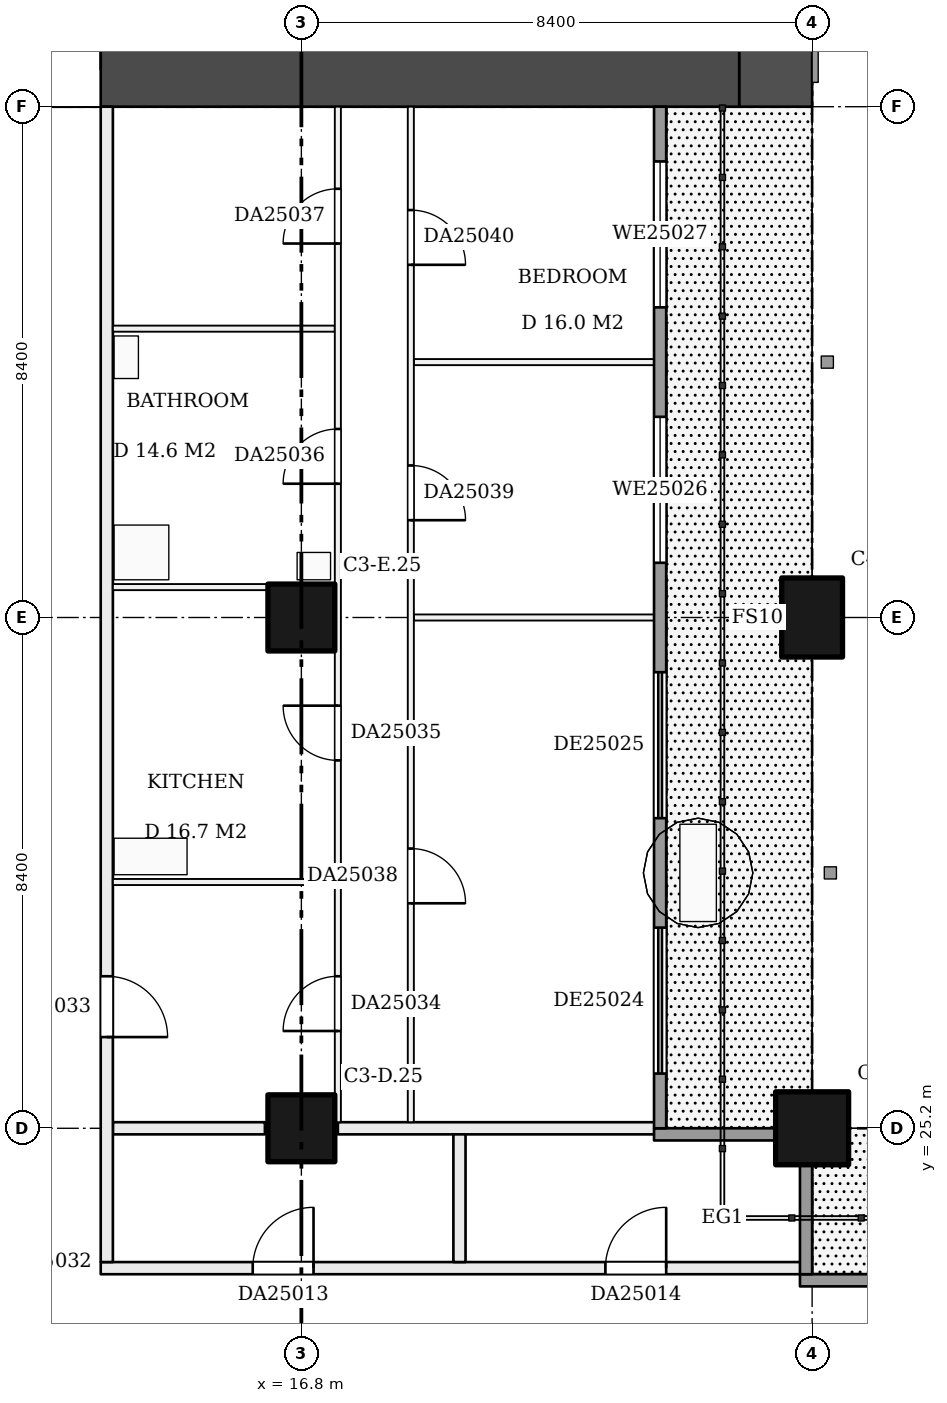
"""IFC4 building model, lengths in metres.
Left out: names, types, materials, properties, quantities, classifications, styles, units other than length and angle.
Written with IfcOpenShell. Run it as: python <this file> out.ifc"""

import sys

from ifc_helpers import new_model, si_unit, direction, frame, frame_2d, origin, origin_2d, place, context, subcontext, project, spatial, rectangle, extrude, element, fill, save


model = new_model("IFC4")
c1 = context("Model", 3, precision=1e-05, world=origin(), true_north=direction((0.0, 1.0)))
c2 = subcontext(c1, "Body", "Model", "MODEL_VIEW")
j1 = project(units=[si_unit("LENGTHUNIT", "METRE"), si_unit("PLANEANGLEUNIT", "RADIAN")], contexts=[c1])
p1 = place(None, origin())
s1 = spatial("IfcSite", under=j1, at=p1, CompositionType="ELEMENT")
p2 = place(p1, origin())
s2 = spatial("IfcBuilding", under=s1, at=p2, CompositionType="ELEMENT")
p3 = place(p2, frame((0.0, 0.0, 102.2)))
s3 = spatial("IfcBuildingStorey", under=s2, at=p3, CompositionType="ELEMENT", Elevation=102.2)
for number, where, z_axis, x_axis in (
    (1, (16.8, 25.2, 0.0), (0.0, 0.0, 1.0), (1.0, 0.0, 0.0)),
    (2, (16.8, 33.6, 0.0), (0.0, 0.0, 1.0), (1.0, 0.0, 0.0)),
):
    element("IfcColumn", number, at=place(p3, frame(where, z_axis=z_axis, x_axis=x_axis)), inside=s3, PredefinedType="COLUMN", context=c2, shape_type="SweptSolid", body=[
        extrude(rectangle(XDim=1.1, YDim=1.1, at=origin_2d()), origin(), (0.0, 0.0, 1.0), 3.22),
    ])
p4 = place(p3, frame((25.2, 25.2, 0.0), z_axis=(0.0, 0.0, 1.0), x_axis=(1.0, 0.0, 0.0)))
e3 = element("IfcColumn", 3, at=p4, inside=s3, PredefinedType="COLUMN", context=c2, shape_type="SweptSolid", body=[
    extrude(rectangle(XDim=1.2, YDim=1.2, at=origin_2d()), origin(), (0.0, 0.0, 1.0), 3.22),
])
p5 = place(p3, frame((25.2, 33.6, 0.0), z_axis=(0.0, 0.0, 1.0), x_axis=(0.0, 1.0, 0.0)))
e4 = element("IfcColumn", 4, at=p5, inside=s3, PredefinedType="COLUMN", context=c2, shape_type="SweptSolid", body=[
    extrude(rectangle(XDim=1.3, YDim=1.0, at=origin_2d()), origin(), (0.0, 0.0, 1.0), 3.22),
])
p6 = place(p3, frame((24.6, 58.8, 0.0), z_axis=(0.0, 0.0, 1.0), x_axis=(0.0, -1.0, 0.0)))
e5 = element("IfcWall", 5, at=p6, inside=s3, PredefinedType="SHEAR", context=c2, shape_type="SweptSolid", body=[
    extrude(rectangle(XDim=16.8, YDim=1.2, at=frame_2d((8.4, 0.0))), origin(), (0.0, 0.0, 1.0), 3.22),
])
p7 = place(p6, frame((1.8, 0.0, 0.5)))
e6 = element("IfcOpeningElement", 6, at=p7, cuts=e5, PredefinedType="OPENING", context=c2, shape_type="SweptSolid", body=[
    extrude(rectangle(XDim=1.8, YDim=2.4, at=frame_2d((0.9, 1.2))), frame((0.0, 0.61, 0.0), z_axis=(0.0, -1.0, 0.0), x_axis=(1.0, 0.0, 0.0)), (0.0, 0.0, 1.0), 1.22),
])
p8 = place(p6, frame((4.625, 0.0, 1.6)))
e7 = element("IfcOpeningElement", 7, at=p8, cuts=e5, PredefinedType="OPENING", context=c2, shape_type="SweptSolid", body=[
    extrude(rectangle(XDim=1.8, YDim=1.2, at=frame_2d((0.9, 0.6))), frame((0.0, 0.61, 0.0), z_axis=(0.0, -1.0, 0.0), x_axis=(1.0, 0.0, 0.0)), (0.0, 0.0, 1.0), 1.22),
])
p9 = place(p6, frame((7.05, 0.0, 1.6)))
e8 = element("IfcOpeningElement", 8, at=p9, cuts=e5, PredefinedType="OPENING", context=c2, shape_type="SweptSolid", body=[
    extrude(rectangle(XDim=1.2, YDim=1.2, at=frame_2d((0.6, 0.6))), frame((0.0, 0.61, 0.0), z_axis=(0.0, -1.0, 0.0), x_axis=(1.0, 0.0, 0.0)), (0.0, 0.0, 1.0), 1.22),
])
p10 = place(p6, frame((12.65, 0.0, 0.6)))
e9 = element("IfcOpeningElement", 9, at=p10, cuts=e5, PredefinedType="OPENING", context=c2, shape_type="SweptSolid", body=[
    extrude(rectangle(XDim=1.0, YDim=2.1, at=frame_2d((0.5, 1.05))), frame((0.0, 0.61, 0.0), z_axis=(0.0, -1.0, 0.0), x_axis=(1.0, 0.0, 0.0)), (0.0, 0.0, 1.0), 1.22),
])
p11 = place(p6, frame((14.175, 0.0, 1.6)))
e10 = element("IfcOpeningElement", 10, at=p11, cuts=e5, PredefinedType="OPENING", context=c2, shape_type="SweptSolid", body=[
    extrude(rectangle(XDim=1.2, YDim=1.2, at=frame_2d((0.6, 0.6))), frame((0.0, 0.61, 0.0), z_axis=(0.0, -1.0, 0.0), x_axis=(1.0, 0.0, 0.0)), (0.0, 0.0, 1.0), 1.22),
])
p12 = place(p3, frame((9.6, 42.6, 0.0), z_axis=(0.0, 0.0, 1.0), x_axis=(1.0, 0.0, 0.0)))
e11 = element("IfcWall", 11, at=p12, inside=s3, PredefinedType="SHEAR", context=c2, shape_type="SweptSolid", body=[
    extrude(rectangle(XDim=14.4, YDim=1.2, at=frame_2d((7.2, 0.0))), origin(), (0.0, 0.0, 1.0), 3.22),
])
p13 = place(p12, frame((2.1, 0.0, 0.0)))
e12 = element("IfcOpeningElement", 12, at=p13, cuts=e11, PredefinedType="OPENING", context=c2, shape_type="SweptSolid", body=[
    extrude(rectangle(XDim=1.8, YDim=2.1, at=frame_2d((0.9, 1.05))), frame((0.0, 0.61, 0.0), z_axis=(0.0, -1.0, 0.0), x_axis=(1.0, 0.0, 0.0)), (0.0, 0.0, 1.0), 1.22),
])
p14 = place(p3, frame((13.5, 22.9, 0.0), z_axis=(0.0, 0.0, 1.0), x_axis=(1.0, 0.0, 0.0)))
e13 = element("IfcWall", 13, at=p14, inside=s3, PredefinedType="PARTITIONING", context=c2, shape_type="SweptSolid", body=[
    extrude(rectangle(XDim=11.6, YDim=0.2, at=frame_2d((5.8, 0.0))), origin(), (0.0, 0.0, 1.0), 3.22),
])
p15 = place(p14, frame((2.5, 0.0, 0.0)))
e14 = element("IfcOpeningElement", 14, at=p15, cuts=e13, PredefinedType="OPENING", context=c2, shape_type="SweptSolid", body=[
    extrude(rectangle(XDim=1.0, YDim=2.1, at=frame_2d((0.5, 1.05))), frame((0.0, 0.11, 0.0), z_axis=(0.0, -1.0, 0.0), x_axis=(1.0, 0.0, 0.0)), (0.0, 0.0, 1.0), 0.22),
])
p16 = place(p14, frame((8.3, 0.0, 0.0)))
e15 = element("IfcOpeningElement", 15, at=p16, cuts=e13, PredefinedType="OPENING", context=c2, shape_type="SweptSolid", body=[
    extrude(rectangle(XDim=1.0, YDim=2.1, at=frame_2d((0.5, 1.05))), frame((0.0, 0.11, 0.0), z_axis=(0.0, -1.0, 0.0), x_axis=(1.0, 0.0, 0.0)), (0.0, 0.0, 1.0), 0.22),
])
p17 = place(p3, frame((13.7, 25.2, 0.0), z_axis=(0.0, 0.0, 1.0), x_axis=(1.0, 0.0, 0.0)))
e16 = element("IfcWall", 16, at=p17, inside=s3, PredefinedType="PARTITIONING", context=c2, shape_type="SweptSolid", body=[
    extrude(rectangle(XDim=2.5, YDim=0.2, at=frame_2d((1.25, 0.0))), origin(), (0.0, 0.0, 1.0), 3.22),
])
p18 = place(p3, frame((17.4, 25.2, 0.0), z_axis=(0.0, 0.0, 1.0), x_axis=(1.0, 0.0, 0.0)))
e17 = element("IfcWall", 17, at=p18, inside=s3, PredefinedType="PARTITIONING", context=c2, shape_type="SweptSolid", body=[
    extrude(rectangle(XDim=5.3, YDim=0.2, at=frame_2d((2.65, 0.0))), origin(), (0.0, 0.0, 1.0), 3.22),
])
p19 = place(p3, frame((13.7, 29.25, 0.0), z_axis=(0.0, 0.0, 1.0), x_axis=(1.0, 0.0, 0.0)))
e18 = element("IfcWall", 18, at=p19, inside=s3, PredefinedType="PARTITIONING", context=c2, shape_type="SweptSolid", body=[
    extrude(rectangle(XDim=3.65, YDim=0.1, at=frame_2d((1.825, 0.0))), origin(), (0.0, 0.0, 1.0), 3.22),
])
p20 = place(p3, frame((18.65, 33.6, 0.0), z_axis=(0.0, 0.0, 1.0), x_axis=(1.0, 0.0, 0.0)))
e19 = element("IfcWall", 19, at=p20, inside=s3, PredefinedType="PARTITIONING", context=c2, shape_type="SweptSolid", body=[
    extrude(rectangle(XDim=4.05, YDim=0.1, at=frame_2d((2.025, 0.0))), origin(), (0.0, 0.0, 1.0), 3.22),
])
p21 = place(p3, frame((13.7, 34.1, 0.0), z_axis=(0.0, 0.0, 1.0), x_axis=(1.0, 0.0, 0.0)))
e20 = element("IfcWall", 20, at=p21, inside=s3, PredefinedType="PARTITIONING", context=c2, shape_type="SweptSolid", body=[
    extrude(rectangle(XDim=3.65, YDim=0.1, at=frame_2d((1.825, 0.0))), origin(), (0.0, 0.0, 1.0), 3.22),
])
p22 = place(p3, frame((18.65, 37.8, 0.0), z_axis=(0.0, 0.0, 1.0), x_axis=(1.0, 0.0, 0.0)))
e21 = element("IfcWall", 21, at=p22, inside=s3, PredefinedType="PARTITIONING", context=c2, shape_type="SweptSolid", body=[
    extrude(rectangle(XDim=4.05, YDim=0.1, at=frame_2d((2.025, 0.0))), origin(), (0.0, 0.0, 1.0), 3.22),
])
p23 = place(p3, frame((13.7, 38.35, 0.0), z_axis=(0.0, 0.0, 1.0), x_axis=(1.0, 0.0, 0.0)))
e22 = element("IfcWall", 22, at=p23, inside=s3, PredefinedType="PARTITIONING", context=c2, shape_type="SweptSolid", body=[
    extrude(rectangle(XDim=3.65, YDim=0.1, at=frame_2d((1.825, 0.0))), origin(), (0.0, 0.0, 1.0), 3.22),
])
p24 = place(p3, frame((13.6, 23.0, 0.0), z_axis=(0.0, 0.0, 1.0), x_axis=(0.0, 1.0, 0.0)))
e23 = element("IfcWall", 23, at=p24, inside=s3, PredefinedType="PARTITIONING", context=c2, shape_type="SweptSolid", body=[
    extrude(rectangle(XDim=19.0, YDim=0.2, at=frame_2d((9.5, 0.0))), origin(), (0.0, 0.0, 1.0), 3.22),
])
p25 = place(p24, frame((3.7, 0.0, 0.0)))
e24 = element("IfcOpeningElement", 24, at=p25, cuts=e23, PredefinedType="OPENING", context=c2, shape_type="SweptSolid", body=[
    extrude(rectangle(XDim=1.0, YDim=2.1, at=frame_2d((0.5, 1.05))), frame((0.0, 0.11, 0.0), z_axis=(0.0, -1.0, 0.0), x_axis=(1.0, 0.0, 0.0)), (0.0, 0.0, 1.0), 0.22),
])
p26 = place(p3, frame((17.4, 25.3, 0.0), z_axis=(0.0, 0.0, 1.0), x_axis=(0.0, 1.0, 0.0)))
e25 = element("IfcWall", 25, at=p26, inside=s3, PredefinedType="PARTITIONING", context=c2, shape_type="SweptSolid", body=[
    extrude(rectangle(XDim=16.7, YDim=0.1, at=frame_2d((8.35, 0.0))), origin(), (0.0, 0.0, 1.0), 3.22),
])
p27 = place(p26, frame((1.5, 0.0, 0.0)))
e26 = element("IfcOpeningElement", 26, at=p27, cuts=e25, PredefinedType="OPENING", context=c2, shape_type="SweptSolid", body=[
    extrude(rectangle(XDim=0.9, YDim=2.1, at=frame_2d((0.45, 1.05))), frame((0.0, 0.06, 0.0), z_axis=(0.0, -1.0, 0.0), x_axis=(1.0, 0.0, 0.0)), (0.0, 0.0, 1.0), 0.12),
])
p28 = place(p26, frame((5.95, 0.0, 0.0)))
e27 = element("IfcOpeningElement", 27, at=p28, cuts=e25, PredefinedType="OPENING", context=c2, shape_type="SweptSolid", body=[
    extrude(rectangle(XDim=0.9, YDim=2.1, at=frame_2d((0.45, 1.05))), frame((0.0, 0.06, 0.0), z_axis=(0.0, -1.0, 0.0), x_axis=(1.0, 0.0, 0.0)), (0.0, 0.0, 1.0), 0.12),
])
p29 = place(p26, frame((10.5, 0.0, 0.0)))
e28 = element("IfcOpeningElement", 28, at=p29, cuts=e25, PredefinedType="OPENING", context=c2, shape_type="SweptSolid", body=[
    extrude(rectangle(XDim=0.9, YDim=2.1, at=frame_2d((0.45, 1.05))), frame((0.0, 0.06, 0.0), z_axis=(0.0, -1.0, 0.0), x_axis=(1.0, 0.0, 0.0)), (0.0, 0.0, 1.0), 0.12),
])
p30 = place(p26, frame((14.45, 0.0, 0.0)))
e29 = element("IfcOpeningElement", 29, at=p30, cuts=e25, PredefinedType="OPENING", context=c2, shape_type="SweptSolid", body=[
    extrude(rectangle(XDim=0.9, YDim=2.1, at=frame_2d((0.45, 1.05))), frame((0.0, 0.06, 0.0), z_axis=(0.0, -1.0, 0.0), x_axis=(1.0, 0.0, 0.0)), (0.0, 0.0, 1.0), 0.12),
])
p31 = place(p3, frame((18.6, 25.3, 0.0), z_axis=(0.0, 0.0, 1.0), x_axis=(0.0, 1.0, 0.0)))
e30 = element("IfcWall", 30, at=p31, inside=s3, PredefinedType="PARTITIONING", context=c2, shape_type="SweptSolid", body=[
    extrude(rectangle(XDim=16.7, YDim=0.1, at=frame_2d((8.35, 0.0))), origin(), (0.0, 0.0, 1.0), 3.22),
])
p32 = place(p31, frame((3.6, 0.0, 0.0)))
e31 = element("IfcOpeningElement", 31, at=p32, cuts=e30, PredefinedType="OPENING", context=c2, shape_type="SweptSolid", body=[
    extrude(rectangle(XDim=0.9, YDim=2.1, at=frame_2d((0.45, 1.05))), frame((0.0, 0.06, 0.0), z_axis=(0.0, -1.0, 0.0), x_axis=(1.0, 0.0, 0.0)), (0.0, 0.0, 1.0), 0.12),
])
p33 = place(p31, frame((9.9, 0.0, 0.0)))
e32 = element("IfcOpeningElement", 32, at=p33, cuts=e30, PredefinedType="OPENING", context=c2, shape_type="SweptSolid", body=[
    extrude(rectangle(XDim=0.9, YDim=2.1, at=frame_2d((0.45, 1.05))), frame((0.0, 0.06, 0.0), z_axis=(0.0, -1.0, 0.0), x_axis=(1.0, 0.0, 0.0)), (0.0, 0.0, 1.0), 0.12),
])
p34 = place(p31, frame((14.1, 0.0, 0.0)))
e33 = element("IfcOpeningElement", 33, at=p34, cuts=e30, PredefinedType="OPENING", context=c2, shape_type="SweptSolid", body=[
    extrude(rectangle(XDim=0.9, YDim=2.1, at=frame_2d((0.45, 1.05))), frame((0.0, 0.06, 0.0), z_axis=(0.0, -1.0, 0.0), x_axis=(1.0, 0.0, 0.0)), (0.0, 0.0, 1.0), 0.12),
])
p35 = place(p3, frame((19.4, 23.0, 0.0), z_axis=(0.0, 0.0, 1.0), x_axis=(0.0, 1.0, 0.0)))
e34 = element("IfcWall", 34, at=p35, inside=s3, PredefinedType="PARTITIONING", context=c2, shape_type="SweptSolid", body=[
    extrude(rectangle(XDim=2.1, YDim=0.2, at=frame_2d((1.05, 0.0))), origin(), (0.0, 0.0, 1.0), 3.22),
])
p36 = place(p3, frame((42.0, 22.7, 0.0), z_axis=(0.0, 0.0, 1.0), x_axis=(-1.0, 0.0, 0.0)))
e35 = element("IfcWall", 35, at=p36, inside=s3, PredefinedType="SOLIDWALL", context=c2, shape_type="SweptSolid", body=[
    extrude(rectangle(XDim=17.0, YDim=0.2, at=frame_2d((8.5, 0.0))), origin(), (0.0, 0.0, 1.0), 3.22),
])
p37 = place(p36, frame((9.6, 0.0, 0.0)))
e36 = element("IfcOpeningElement", 36, at=p37, cuts=e35, PredefinedType="OPENING", context=c2, shape_type="SweptSolid", body=[
    extrude(rectangle(XDim=1.8, YDim=2.4, at=frame_2d((0.9, 1.2))), frame((0.0, 0.11, 0.0), z_axis=(0.0, -1.0, 0.0), x_axis=(1.0, 0.0, 0.0)), (0.0, 0.0, 1.0), 0.22),
])
p38 = place(p3, frame((25.1, 22.8, 0.0), z_axis=(0.0, 0.0, 1.0), x_axis=(0.0, 1.0, 0.0)))
e37 = element("IfcWall", 37, at=p38, inside=s3, PredefinedType="SOLIDWALL", context=c2, shape_type="SweptSolid", body=[
    extrude(rectangle(XDim=1.8, YDim=0.2, at=frame_2d((0.9, 0.0))), origin(), (0.0, 0.0, 1.0), 3.22),
])
p39 = place(p3, frame((24.6, 25.1, 0.0), z_axis=(0.0, 0.0, 1.0), x_axis=(-1.0, 0.0, 0.0)))
e38 = element("IfcWall", 38, at=p39, inside=s3, PredefinedType="SOLIDWALL", context=c2, shape_type="SweptSolid", body=[
    extrude(rectangle(XDim=2.0, YDim=0.2, at=frame_2d((1.0, 0.0))), origin(), (0.0, 0.0, 1.0), 3.22),
])
p40 = place(p3, frame((22.7, 25.2, 0.0), z_axis=(0.0, 0.0, 1.0), x_axis=(0.0, 1.0, 0.0)))
e39 = element("IfcWall", 39, at=p40, inside=s3, PredefinedType="SOLIDWALL", context=c2, shape_type="SweptSolid", body=[
    extrude(rectangle(XDim=16.8, YDim=0.2, at=frame_2d((8.4, 0.0))), origin(), (0.0, 0.0, 1.0), 3.22),
])
p41 = place(p40, frame((0.9, 0.0, 0.0)))
e40 = element("IfcOpeningElement", 40, at=p41, cuts=e39, PredefinedType="OPENING", context=c2, shape_type="SweptSolid", body=[
    extrude(rectangle(XDim=2.4, YDim=2.2, at=frame_2d((1.2, 1.1))), frame((0.0, 0.11, 0.0), z_axis=(0.0, -1.0, 0.0), x_axis=(1.0, 0.0, 0.0)), (0.0, 0.0, 1.0), 0.22),
])
p42 = place(p40, frame((5.1, 0.0, 0.0)))
e41 = element("IfcOpeningElement", 41, at=p42, cuts=e39, PredefinedType="OPENING", context=c2, shape_type="SweptSolid", body=[
    extrude(rectangle(XDim=2.4, YDim=2.2, at=frame_2d((1.2, 1.1))), frame((0.0, 0.11, 0.0), z_axis=(0.0, -1.0, 0.0), x_axis=(1.0, 0.0, 0.0)), (0.0, 0.0, 1.0), 0.22),
])
p43 = place(p40, frame((9.3, 0.0, 0.9)))
e42 = element("IfcOpeningElement", 42, at=p43, cuts=e39, PredefinedType="OPENING", context=c2, shape_type="SweptSolid", body=[
    extrude(rectangle(XDim=2.4, YDim=1.5, at=frame_2d((1.2, 0.75))), frame((0.0, 0.11, 0.0), z_axis=(0.0, -1.0, 0.0), x_axis=(1.0, 0.0, 0.0)), (0.0, 0.0, 1.0), 0.22),
])
p44 = place(p40, frame((13.5, 0.0, 0.9)))
e43 = element("IfcOpeningElement", 43, at=p44, cuts=e39, PredefinedType="OPENING", context=c2, shape_type="SweptSolid", body=[
    extrude(rectangle(XDim=2.4, YDim=1.5, at=frame_2d((1.2, 0.75))), frame((0.0, 0.11, 0.0), z_axis=(0.0, -1.0, 0.0), x_axis=(1.0, 0.0, 0.0)), (0.0, 0.0, 1.0), 0.22),
])
p45 = place(p13, origin())
e44 = element("IfcDoor", 44, at=p45, inside=s3, OperationType="DOUBLE_DOOR_SINGLE_SWING", PredefinedType="DOOR", context=c2, shape_type="SweptSolid", body=[
    extrude(rectangle(XDim=1.8, YDim=2.1, at=frame_2d((0.9, 1.05))), frame((0.0, 0.025, 0.0), z_axis=(0.0, -1.0, 0.0), x_axis=(1.0, 0.0, 0.0)), (0.0, 0.0, 1.0), 0.05),
])
fill(e12, e44)
p46 = place(p15, origin())
e45 = element("IfcDoor", 45, at=p46, inside=s3, OperationType="SINGLE_SWING_RIGHT", PredefinedType="DOOR", context=c2, shape_type="SweptSolid", body=[
    extrude(rectangle(XDim=1.0, YDim=2.1, at=frame_2d((0.5, 1.05))), frame((0.0, 0.025, 0.0), z_axis=(0.0, -1.0, 0.0), x_axis=(1.0, 0.0, 0.0)), (0.0, 0.0, 1.0), 0.05),
])
fill(e14, e45)
p47 = place(p16, origin())
e46 = element("IfcDoor", 46, at=p47, inside=s3, OperationType="SINGLE_SWING_RIGHT", PredefinedType="DOOR", context=c2, shape_type="SweptSolid", body=[
    extrude(rectangle(XDim=1.0, YDim=2.1, at=frame_2d((0.5, 1.05))), frame((0.0, 0.025, 0.0), z_axis=(0.0, -1.0, 0.0), x_axis=(1.0, 0.0, 0.0)), (0.0, 0.0, 1.0), 0.05),
])
fill(e15, e46)
p48 = place(p25, frame((1.0, 0.0, 0.0), z_axis=(0.0, 0.0, 1.0), x_axis=(-1.0, 0.0, 0.0)))
e47 = element("IfcDoor", 47, at=p48, inside=s3, OperationType="SINGLE_SWING_RIGHT", PredefinedType="DOOR", context=c2, shape_type="SweptSolid", body=[
    extrude(rectangle(XDim=1.0, YDim=2.1, at=frame_2d((0.5, 1.05))), frame((0.0, 0.025, 0.0), z_axis=(0.0, -1.0, 0.0), x_axis=(1.0, 0.0, 0.0)), (0.0, 0.0, 1.0), 0.05),
])
fill(e24, e47)
p49 = place(p27, origin())
e48 = element("IfcDoor", 48, at=p49, inside=s3, OperationType="SINGLE_SWING_LEFT", PredefinedType="DOOR", context=c2, shape_type="SweptSolid", body=[
    extrude(rectangle(XDim=0.9, YDim=2.1, at=frame_2d((0.45, 1.05))), frame((0.0, 0.025, 0.0), z_axis=(0.0, -1.0, 0.0), x_axis=(1.0, 0.0, 0.0)), (0.0, 0.0, 1.0), 0.05),
])
fill(e26, e48)
p50 = place(p28, origin())
e49 = element("IfcDoor", 49, at=p50, inside=s3, OperationType="SINGLE_SWING_RIGHT", PredefinedType="DOOR", context=c2, shape_type="SweptSolid", body=[
    extrude(rectangle(XDim=0.9, YDim=2.1, at=frame_2d((0.45, 1.05))), frame((0.0, 0.025, 0.0), z_axis=(0.0, -1.0, 0.0), x_axis=(1.0, 0.0, 0.0)), (0.0, 0.0, 1.0), 0.05),
])
fill(e27, e49)
p51 = place(p29, origin())
e50 = element("IfcDoor", 50, at=p51, inside=s3, OperationType="SINGLE_SWING_LEFT", PredefinedType="DOOR", context=c2, shape_type="SweptSolid", body=[
    extrude(rectangle(XDim=0.9, YDim=2.1, at=frame_2d((0.45, 1.05))), frame((0.0, 0.025, 0.0), z_axis=(0.0, -1.0, 0.0), x_axis=(1.0, 0.0, 0.0)), (0.0, 0.0, 1.0), 0.05),
])
fill(e28, e50)
p52 = place(p30, origin())
e51 = element("IfcDoor", 51, at=p52, inside=s3, OperationType="SINGLE_SWING_LEFT", PredefinedType="DOOR", context=c2, shape_type="SweptSolid", body=[
    extrude(rectangle(XDim=0.9, YDim=2.1, at=frame_2d((0.45, 1.05))), frame((0.0, 0.025, 0.0), z_axis=(0.0, -1.0, 0.0), x_axis=(1.0, 0.0, 0.0)), (0.0, 0.0, 1.0), 0.05),
])
fill(e29, e51)
p53 = place(p32, frame((0.9, 0.0, 0.0), z_axis=(0.0, 0.0, 1.0), x_axis=(-1.0, 0.0, 0.0)))
e52 = element("IfcDoor", 52, at=p53, inside=s3, OperationType="SINGLE_SWING_RIGHT", PredefinedType="DOOR", context=c2, shape_type="SweptSolid", body=[
    extrude(rectangle(XDim=0.9, YDim=2.1, at=frame_2d((0.45, 1.05))), frame((0.0, 0.025, 0.0), z_axis=(0.0, -1.0, 0.0), x_axis=(1.0, 0.0, 0.0)), (0.0, 0.0, 1.0), 0.05),
])
fill(e31, e52)
p54 = place(p33, frame((0.9, 0.0, 0.0), z_axis=(0.0, 0.0, 1.0), x_axis=(-1.0, 0.0, 0.0)))
e53 = element("IfcDoor", 53, at=p54, inside=s3, OperationType="SINGLE_SWING_RIGHT", PredefinedType="DOOR", context=c2, shape_type="SweptSolid", body=[
    extrude(rectangle(XDim=0.9, YDim=2.1, at=frame_2d((0.45, 1.05))), frame((0.0, 0.025, 0.0), z_axis=(0.0, -1.0, 0.0), x_axis=(1.0, 0.0, 0.0)), (0.0, 0.0, 1.0), 0.05),
])
fill(e32, e53)
p55 = place(p34, frame((0.9, 0.0, 0.0), z_axis=(0.0, 0.0, 1.0), x_axis=(-1.0, 0.0, 0.0)))
e54 = element("IfcDoor", 54, at=p55, inside=s3, OperationType="SINGLE_SWING_RIGHT", PredefinedType="DOOR", context=c2, shape_type="SweptSolid", body=[
    extrude(rectangle(XDim=0.9, YDim=2.1, at=frame_2d((0.45, 1.05))), frame((0.0, 0.025, 0.0), z_axis=(0.0, -1.0, 0.0), x_axis=(1.0, 0.0, 0.0)), (0.0, 0.0, 1.0), 0.05),
])
fill(e33, e54)
p56 = place(p41, origin())
e55 = element("IfcDoor", 55, at=p56, inside=s3, OperationType="DOUBLE_DOOR_SLIDING", PredefinedType="DOOR", context=c2, shape_type="SweptSolid", body=[
    extrude(rectangle(XDim=2.4, YDim=2.2, at=frame_2d((1.2, 1.1))), frame((0.0, 0.025, 0.0), z_axis=(0.0, -1.0, 0.0), x_axis=(1.0, 0.0, 0.0)), (0.0, 0.0, 1.0), 0.05),
])
fill(e40, e55)
p57 = place(p42, origin())
e56 = element("IfcDoor", 56, at=p57, inside=s3, OperationType="DOUBLE_DOOR_SLIDING", PredefinedType="DOOR", context=c2, shape_type="SweptSolid", body=[
    extrude(rectangle(XDim=2.4, YDim=2.2, at=frame_2d((1.2, 1.1))), frame((0.0, 0.025, 0.0), z_axis=(0.0, -1.0, 0.0), x_axis=(1.0, 0.0, 0.0)), (0.0, 0.0, 1.0), 0.05),
])
fill(e41, e56)
p58 = place(p43, origin())
e57 = element("IfcWindow", 57, at=p58, inside=s3, PartitioningType="SINGLE_PANEL", PredefinedType="WINDOW", context=c2, shape_type="SweptSolid", body=[
    extrude(rectangle(XDim=2.4, YDim=1.5, at=frame_2d((1.2, 0.75))), frame((0.0, 0.03, 0.0), z_axis=(0.0, -1.0, 0.0), x_axis=(1.0, 0.0, 0.0)), (0.0, 0.0, 1.0), 0.06),
])
fill(e42, e57)
p59 = place(p44, origin())
e58 = element("IfcWindow", 58, at=p59, inside=s3, PartitioningType="SINGLE_PANEL", PredefinedType="WINDOW", context=c2, shape_type="SweptSolid", body=[
    extrude(rectangle(XDim=2.4, YDim=1.5, at=frame_2d((1.2, 0.75))), frame((0.0, 0.03, 0.0), z_axis=(0.0, -1.0, 0.0), x_axis=(1.0, 0.0, 0.0)), (0.0, 0.0, 1.0), 0.06),
])
fill(e43, e58)
save(model, sys.argv[1])
